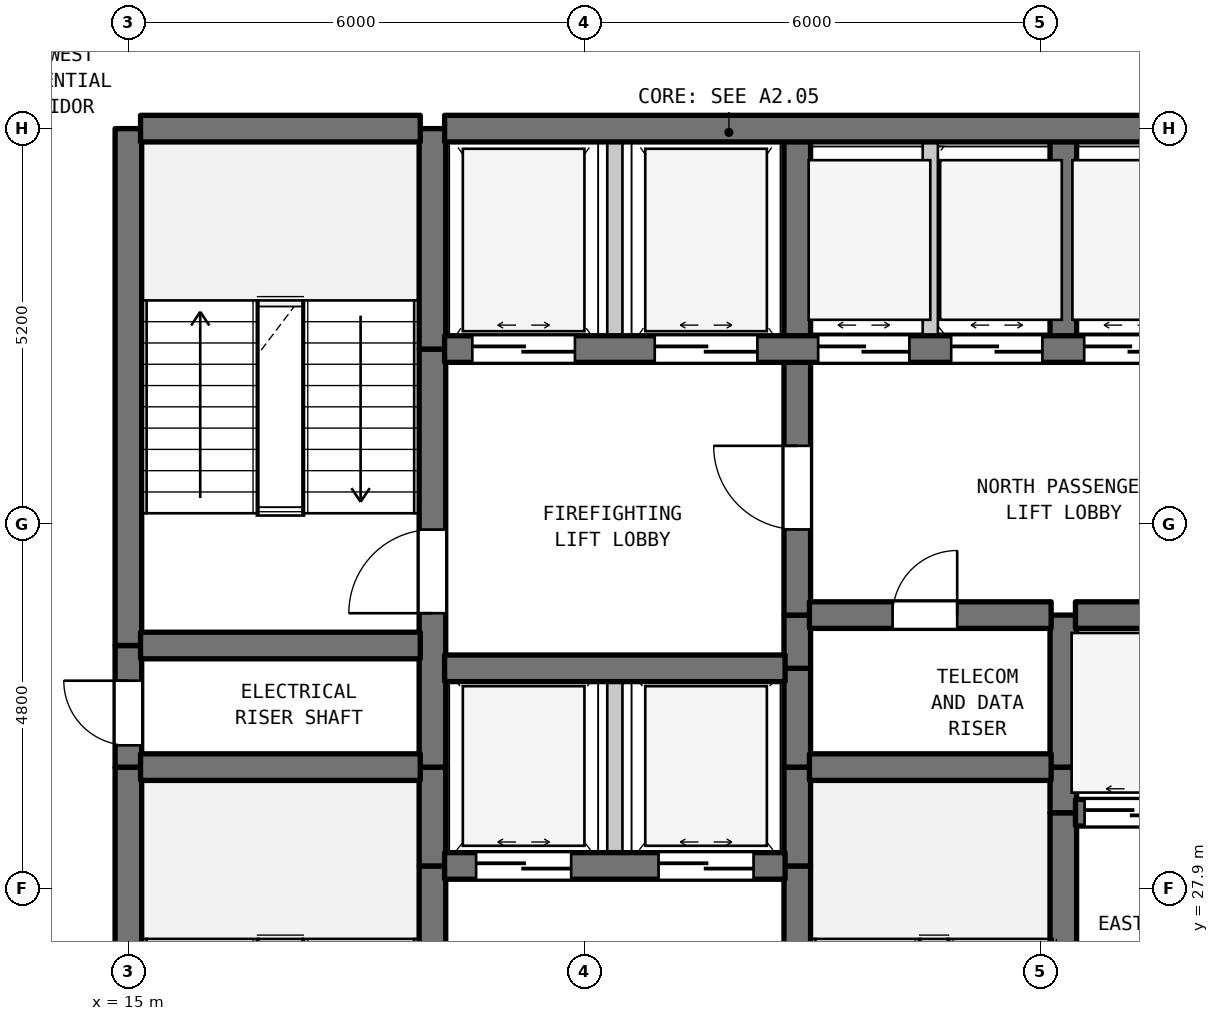
"""IFC4 building model, lengths in metres.
Left out: names, types, materials, properties, quantities, classifications, styles, units other than length and angle.
Written with IfcOpenShell. Run it as: python <this file> out.ifc"""

import sys

from ifc_helpers import new_model, si_unit, direction, frame, frame_2d, origin, place, context, subcontext, project, spatial, rectangle, extrude, element, fill, save


model = new_model("IFC4")
c1 = context("Model", 3, precision=1e-05, world=origin(), true_north=direction((0.0, 1.0)))
c2 = subcontext(c1, "Body", "Model", "MODEL_VIEW")
j1 = project(units=[si_unit("LENGTHUNIT", "METRE"), si_unit("PLANEANGLEUNIT", "RADIAN")], contexts=[c1])
p1 = place(None, origin())
s1 = spatial("IfcSite", under=j1, at=p1, CompositionType="ELEMENT")
p2 = place(p1, origin())
s2 = spatial("IfcBuilding", under=s1, at=p2, CompositionType="ELEMENT")
p3 = place(p2, frame((0.0, 0.0, 77.5)))
s3 = spatial("IfcBuildingStorey", under=s2, at=p3, CompositionType="ELEMENT", Elevation=77.5)
p4 = place(p3, frame((15.0, 22.7, 0.0), z_axis=(0.0, 0.0, 1.0), x_axis=(0.0, 1.0, 0.0)))
e1 = element("IfcWall", 1, at=p4, inside=s3, PredefinedType="SHEAR", context=c2, shape_type="SweptSolid", body=[
    extrude(rectangle(XDim=6.8, YDim=0.35, at=frame_2d((3.4, 0.0))), origin(), (0.0, 0.0, 1.0), 3.28),
])
p5 = place(p3, frame((15.0, 29.5, 0.0), z_axis=(0.0, 0.0, 1.0), x_axis=(0.0, 1.0, 0.0)))
e2 = element("IfcWall", 2, at=p5, inside=s3, PredefinedType="SHEAR", context=c2, shape_type="SweptSolid", body=[
    extrude(rectangle(XDim=1.6, YDim=0.35, at=frame_2d((0.8, 0.0))), origin(), (0.0, 0.0, 1.0), 3.28),
])
p6 = place(p5, frame((0.287, 0.0, 0.0)))
e3 = element("IfcOpeningElement", 3, at=p6, cuts=e2, PredefinedType="OPENING", context=c2, shape_type="SweptSolid", body=[
    extrude(rectangle(XDim=0.85, YDim=2.1, at=frame_2d((0.425, 1.05))), frame((0.0, 0.185, 0.0), z_axis=(0.0, -1.0, 0.0), x_axis=(1.0, 0.0, 0.0)), (0.0, 0.0, 1.0), 0.37),
])
p7 = place(p3, frame((15.0, 31.1, 0.0), z_axis=(0.0, 0.0, 1.0), x_axis=(0.0, 1.0, 0.0)))
e4 = element("IfcWall", 4, at=p7, inside=s3, PredefinedType="SHEAR", context=c2, shape_type="SweptSolid", body=[
    extrude(rectangle(XDim=6.8, YDim=0.35, at=frame_2d((3.4, 0.0))), origin(), (0.0, 0.0, 1.0), 3.28),
])
p8 = place(p3, frame((19.0, 22.7, 0.0), z_axis=(0.0, 0.0, 1.0), x_axis=(0.0, 1.0, 0.0)))
e5 = element("IfcWall", 5, at=p8, inside=s3, PredefinedType="SHEAR", context=c2, shape_type="SweptSolid", body=[
    extrude(rectangle(XDim=5.5, YDim=0.35, at=frame_2d((2.75, 0.0))), origin(), (0.0, 0.0, 1.0), 3.28),
])
p9 = place(p8, frame((0.631, 0.0, 0.0)))
e6 = element("IfcOpeningElement", 6, at=p9, cuts=e5, PredefinedType="OPENING", context=c2, shape_type="SweptSolid", body=[
    extrude(rectangle(XDim=1.1, YDim=2.15, at=frame_2d((0.55, 1.075))), frame((0.0, 0.185, 0.0), z_axis=(0.0, -1.0, 0.0), x_axis=(1.0, 0.0, 0.0)), (0.0, 0.0, 1.0), 0.37),
])
p10 = place(p3, frame((19.0, 28.2, 0.0), z_axis=(0.0, 0.0, 1.0), x_axis=(0.0, 1.0, 0.0)))
e7 = element("IfcWall", 7, at=p10, inside=s3, PredefinedType="SHEAR", context=c2, shape_type="SweptSolid", body=[
    extrude(rectangle(XDim=1.3, YDim=0.35, at=frame_2d((0.65, 0.0))), origin(), (0.0, 0.0, 1.0), 3.28),
])
p11 = place(p3, frame((19.0, 29.5, 0.0), z_axis=(0.0, 0.0, 1.0), x_axis=(0.0, 1.0, 0.0)))
e8 = element("IfcWall", 8, at=p11, inside=s3, PredefinedType="SHEAR", context=c2, shape_type="SweptSolid", body=[
    extrude(rectangle(XDim=5.5, YDim=0.35, at=frame_2d((2.75, 0.0))), origin(), (0.0, 0.0, 1.0), 3.28),
])
p12 = place(p11, frame((2.025, 0.0, 0.0)))
e9 = element("IfcOpeningElement", 9, at=p12, cuts=e8, PredefinedType="OPENING", context=c2, shape_type="SweptSolid", body=[
    extrude(rectangle(XDim=1.1, YDim=2.15, at=frame_2d((0.55, 1.075))), frame((0.0, 0.185, 0.0), z_axis=(0.0, -1.0, 0.0), x_axis=(1.0, 0.0, 0.0)), (0.0, 0.0, 1.0), 0.37),
])
p13 = place(p3, frame((19.0, 35.0, 0.0), z_axis=(0.0, 0.0, 1.0), x_axis=(0.0, 1.0, 0.0)))
e10 = element("IfcWall", 10, at=p13, inside=s3, PredefinedType="SHEAR", context=c2, shape_type="SweptSolid", body=[
    extrude(rectangle(XDim=2.9, YDim=0.35, at=frame_2d((1.45, 0.0))), origin(), (0.0, 0.0, 1.0), 3.28),
])
p14 = place(p3, frame((21.4, 28.2, 0.0), z_axis=(0.0, 0.0, 1.0), x_axis=(0.0, 1.0, 0.0)))
e11 = element("IfcWall", 11, at=p14, inside=s3, PredefinedType="STANDARD", context=c2, shape_type="SweptSolid", body=[
    extrude(rectangle(XDim=2.6, YDim=0.2, at=frame_2d((1.3, 0.0))), origin(), (0.0, 0.0, 1.0), 3.28),
])
p15 = place(p3, frame((21.4, 35.0, 0.0), z_axis=(0.0, 0.0, 1.0), x_axis=(0.0, 1.0, 0.0)))
e12 = element("IfcWall", 12, at=p15, inside=s3, PredefinedType="STANDARD", context=c2, shape_type="SweptSolid", body=[
    extrude(rectangle(XDim=2.9, YDim=0.2, at=frame_2d((1.45, 0.0))), origin(), (0.0, 0.0, 1.0), 3.28),
])
p16 = place(p3, frame((23.8, 22.7, 0.0), z_axis=(0.0, 0.0, 1.0), x_axis=(0.0, 1.0, 0.0)))
e13 = element("IfcWall", 13, at=p16, inside=s3, PredefinedType="SHEAR", context=c2, shape_type="SweptSolid", body=[
    extrude(rectangle(XDim=5.5, YDim=0.35, at=frame_2d((2.75, 0.0))), origin(), (0.0, 0.0, 1.0), 3.28),
])
p17 = place(p16, frame((0.235, 0.0, 0.0)))
e14 = element("IfcOpeningElement", 14, at=p17, cuts=e13, PredefinedType="OPENING", context=c2, shape_type="SweptSolid", body=[
    extrude(rectangle(XDim=1.1, YDim=2.15, at=frame_2d((0.55, 1.075))), frame((0.0, 0.185, 0.0), z_axis=(0.0, -1.0, 0.0), x_axis=(1.0, 0.0, 0.0)), (0.0, 0.0, 1.0), 0.37),
])
for number, where, z_axis, x_axis in (
    (15, (23.8, 28.2, 0.0), (0.0, 0.0, 1.0), (0.0, 1.0, 0.0)),
    (16, (23.8, 29.5, 0.0), (0.0, 0.0, 1.0), (0.0, 1.0, 0.0)),
):
    element("IfcWall", number, at=place(p3, frame(where, z_axis=z_axis, x_axis=x_axis)), inside=s3, PredefinedType="SHEAR", context=c2, shape_type="SweptSolid", body=[
        extrude(rectangle(XDim=1.3, YDim=0.35, at=frame_2d((0.65, 0.0))), origin(), (0.0, 0.0, 1.0), 3.28),
    ])
p18 = place(p3, frame((23.8, 30.8, 0.0), z_axis=(0.0, 0.0, 1.0), x_axis=(0.0, 1.0, 0.0)))
e17 = element("IfcWall", 17, at=p18, inside=s3, PredefinedType="SHEAR", context=c2, shape_type="SweptSolid", body=[
    extrude(rectangle(XDim=0.7, YDim=0.35, at=frame_2d((0.35, 0.0))), origin(), (0.0, 0.0, 1.0), 3.28),
])
p19 = place(p3, frame((23.8, 31.5, 0.0), z_axis=(0.0, 0.0, 1.0), x_axis=(0.0, 1.0, 0.0)))
e18 = element("IfcWall", 18, at=p19, inside=s3, PredefinedType="SHEAR", context=c2, shape_type="SweptSolid", body=[
    extrude(rectangle(XDim=3.5, YDim=0.35, at=frame_2d((1.75, 0.0))), origin(), (0.0, 0.0, 1.0), 3.28),
])
p20 = place(p19, frame((1.127, 0.0, 0.0)))
e19 = element("IfcOpeningElement", 19, at=p20, cuts=e18, PredefinedType="OPENING", context=c2, shape_type="SweptSolid", body=[
    extrude(rectangle(XDim=1.1, YDim=2.15, at=frame_2d((0.55, 1.075))), frame((0.0, 0.185, 0.0), z_axis=(0.0, -1.0, 0.0), x_axis=(1.0, 0.0, 0.0)), (0.0, 0.0, 1.0), 0.37),
])
p21 = place(p3, frame((23.8, 35.0, 0.0), z_axis=(0.0, 0.0, 1.0), x_axis=(0.0, 1.0, 0.0)))
e20 = element("IfcWall", 20, at=p21, inside=s3, PredefinedType="SHEAR", context=c2, shape_type="SweptSolid", body=[
    extrude(rectangle(XDim=2.9, YDim=0.35, at=frame_2d((1.45, 0.0))), origin(), (0.0, 0.0, 1.0), 3.28),
])
p22 = place(p3, frame((25.55, 35.0, 0.0), z_axis=(0.0, 0.0, 1.0), x_axis=(0.0, 1.0, 0.0)))
e21 = element("IfcWall", 21, at=p22, inside=s3, PredefinedType="STANDARD", context=c2, shape_type="SweptSolid", body=[
    extrude(rectangle(XDim=2.9, YDim=0.2, at=frame_2d((1.45, 0.0))), origin(), (0.0, 0.0, 1.0), 3.28),
])
p23 = place(p3, frame((27.3, 25.6, 0.0), z_axis=(0.0, 0.0, 1.0), x_axis=(0.0, 1.0, 0.0)))
e22 = element("IfcWall", 22, at=p23, inside=s3, PredefinedType="SHEAR", context=c2, shape_type="SweptSolid", body=[
    extrude(rectangle(XDim=3.3, YDim=0.35, at=frame_2d((1.65, 0.0))), origin(), (0.0, 0.0, 1.0), 3.28),
])
p24 = place(p3, frame((27.3, 28.9, 0.0), z_axis=(0.0, 0.0, 1.0), x_axis=(0.0, 1.0, 0.0)))
e23 = element("IfcWall", 23, at=p24, inside=s3, PredefinedType="SHEAR", context=c2, shape_type="SweptSolid", body=[
    extrude(rectangle(XDim=0.6, YDim=0.35, at=frame_2d((0.3, 0.0))), origin(), (0.0, 0.0, 1.0), 3.28),
])
p25 = place(p3, frame((27.3, 29.5, 0.0), z_axis=(0.0, 0.0, 1.0), x_axis=(0.0, 1.0, 0.0)))
e24 = element("IfcWall", 24, at=p25, inside=s3, PredefinedType="SHEAR", context=c2, shape_type="SweptSolid", body=[
    extrude(rectangle(XDim=2.0, YDim=0.35, at=frame_2d((1.0, 0.0))), origin(), (0.0, 0.0, 1.0), 3.28),
])
p26 = place(p3, frame((27.3, 35.0, 0.0), z_axis=(0.0, 0.0, 1.0), x_axis=(0.0, 1.0, 0.0)))
e25 = element("IfcWall", 25, at=p26, inside=s3, PredefinedType="SHEAR", context=c2, shape_type="SweptSolid", body=[
    extrude(rectangle(XDim=2.9, YDim=0.35, at=frame_2d((1.45, 0.0))), origin(), (0.0, 0.0, 1.0), 3.28),
])
p27 = place(p3, frame((19.16, 28.2, 0.0), z_axis=(0.0, 0.0, 1.0), x_axis=(1.0, 0.0, 0.0)))
e26 = element("IfcWall", 26, at=p27, inside=s3, PredefinedType="SHEAR", context=c2, shape_type="SweptSolid", body=[
    extrude(rectangle(XDim=4.48, YDim=0.35, at=frame_2d((2.24, 0.0))), origin(), (0.0, 0.0, 1.0), 3.28),
])
p28 = place(p27, frame((0.415, 0.0, 0.0)))
e27 = element("IfcOpeningElement", 27, at=p28, cuts=e26, PredefinedType="OPENING", context=c2, shape_type="SweptSolid", body=[
    extrude(rectangle(XDim=1.25, YDim=2.2, at=frame_2d((0.625, 1.1))), frame((0.0, 0.185, 0.0), z_axis=(0.0, -1.0, 0.0), x_axis=(1.0, 0.0, 0.0)), (0.0, 0.0, 1.0), 0.37),
])
p29 = place(p27, frame((2.815, 0.0, 0.0)))
e28 = element("IfcOpeningElement", 28, at=p29, cuts=e26, PredefinedType="OPENING", context=c2, shape_type="SweptSolid", body=[
    extrude(rectangle(XDim=1.25, YDim=2.2, at=frame_2d((0.625, 1.1))), frame((0.0, 0.185, 0.0), z_axis=(0.0, -1.0, 0.0), x_axis=(1.0, 0.0, 0.0)), (0.0, 0.0, 1.0), 0.37),
])
p30 = place(p3, frame((27.46, 28.9, 0.0), z_axis=(0.0, 0.0, 1.0), x_axis=(1.0, 0.0, 0.0)))
e29 = element("IfcWall", 29, at=p30, inside=s3, PredefinedType="SHEAR", context=c2, shape_type="SweptSolid", body=[
    extrude(rectangle(XDim=3.18, YDim=0.35, at=frame_2d((1.59, 0.0))), origin(), (0.0, 0.0, 1.0), 3.28),
])
p31 = place(p30, frame((0.12, 0.0, 0.0)))
e30 = element("IfcOpeningElement", 30, at=p31, cuts=e29, PredefinedType="OPENING", context=c2, shape_type="SweptSolid", body=[
    extrude(rectangle(XDim=1.25, YDim=2.2, at=frame_2d((0.625, 1.1))), frame((0.0, 0.185, 0.0), z_axis=(0.0, -1.0, 0.0), x_axis=(1.0, 0.0, 0.0)), (0.0, 0.0, 1.0), 0.37),
])
p32 = place(p30, frame((1.81, 0.0, 0.0)))
e31 = element("IfcOpeningElement", 31, at=p32, cuts=e29, PredefinedType="OPENING", context=c2, shape_type="SweptSolid", body=[
    extrude(rectangle(XDim=1.25, YDim=2.2, at=frame_2d((0.625, 1.1))), frame((0.0, 0.185, 0.0), z_axis=(0.0, -1.0, 0.0), x_axis=(1.0, 0.0, 0.0)), (0.0, 0.0, 1.0), 0.37),
])
p33 = place(p3, frame((15.16, 29.5, 0.0), z_axis=(0.0, 0.0, 1.0), x_axis=(1.0, 0.0, 0.0)))
e32 = element("IfcWall", 32, at=p33, inside=s3, PredefinedType="SHEAR", context=c2, shape_type="SweptSolid", body=[
    extrude(rectangle(XDim=3.68, YDim=0.35, at=frame_2d((1.84, 0.0))), origin(), (0.0, 0.0, 1.0), 3.28),
])
p34 = place(p3, frame((23.96, 29.5, 0.0), z_axis=(0.0, 0.0, 1.0), x_axis=(1.0, 0.0, 0.0)))
e33 = element("IfcWall", 33, at=p34, inside=s3, PredefinedType="SHEAR", context=c2, shape_type="SweptSolid", body=[
    extrude(rectangle(XDim=3.18, YDim=0.35, at=frame_2d((1.59, 0.0))), origin(), (0.0, 0.0, 1.0), 3.28),
])
p35 = place(p3, frame((19.16, 30.8, 0.0), z_axis=(0.0, 0.0, 1.0), x_axis=(1.0, 0.0, 0.0)))
e34 = element("IfcWall", 34, at=p35, inside=s3, PredefinedType="SHEAR", context=c2, shape_type="SweptSolid", body=[
    extrude(rectangle(XDim=4.48, YDim=0.35, at=frame_2d((2.24, 0.0))), origin(), (0.0, 0.0, 1.0), 3.28),
])
p36 = place(p3, frame((15.16, 31.1, 0.0), z_axis=(0.0, 0.0, 1.0), x_axis=(1.0, 0.0, 0.0)))
e35 = element("IfcWall", 35, at=p36, inside=s3, PredefinedType="SHEAR", context=c2, shape_type="SweptSolid", body=[
    extrude(rectangle(XDim=3.68, YDim=0.35, at=frame_2d((1.84, 0.0))), origin(), (0.0, 0.0, 1.0), 3.28),
])
p37 = place(p3, frame((23.96, 31.5, 0.0), z_axis=(0.0, 0.0, 1.0), x_axis=(1.0, 0.0, 0.0)))
e36 = element("IfcWall", 36, at=p37, inside=s3, PredefinedType="SHEAR", context=c2, shape_type="SweptSolid", body=[
    extrude(rectangle(XDim=3.18, YDim=0.35, at=frame_2d((1.59, 0.0))), origin(), (0.0, 0.0, 1.0), 3.28),
])
p38 = place(p37, frame((1.094, 0.0, 0.0)))
e37 = element("IfcOpeningElement", 37, at=p38, cuts=e36, PredefinedType="OPENING", context=c2, shape_type="SweptSolid", body=[
    extrude(rectangle(XDim=0.85, YDim=2.1, at=frame_2d((0.425, 1.05))), frame((0.0, 0.185, 0.0), z_axis=(0.0, -1.0, 0.0), x_axis=(1.0, 0.0, 0.0)), (0.0, 0.0, 1.0), 0.37),
])
p39 = place(p3, frame((27.46, 31.5, 0.0), z_axis=(0.0, 0.0, 1.0), x_axis=(1.0, 0.0, 0.0)))
e38 = element("IfcWall", 38, at=p39, inside=s3, PredefinedType="SHEAR", context=c2, shape_type="SweptSolid", body=[
    extrude(rectangle(XDim=3.18, YDim=0.35, at=frame_2d((1.59, 0.0))), origin(), (0.0, 0.0, 1.0), 3.28),
])
p40 = place(p3, frame((19.16, 35.0, 0.0), z_axis=(0.0, 0.0, 1.0), x_axis=(1.0, 0.0, 0.0)))
e39 = element("IfcWall", 39, at=p40, inside=s3, PredefinedType="SHEAR", context=c2, shape_type="SweptSolid", body=[
    extrude(rectangle(XDim=11.48, YDim=0.35, at=frame_2d((5.74, 0.0))), origin(), (0.0, 0.0, 1.0), 3.28),
])
p41 = place(p40, frame((0.365, 0.0, 0.0)))
e40 = element("IfcOpeningElement", 40, at=p41, cuts=e39, PredefinedType="OPENING", context=c2, shape_type="SweptSolid", body=[
    extrude(rectangle(XDim=1.35, YDim=2.2, at=frame_2d((0.675, 1.1))), frame((0.0, 0.185, 0.0), z_axis=(0.0, -1.0, 0.0), x_axis=(1.0, 0.0, 0.0)), (0.0, 0.0, 1.0), 0.37),
])
p42 = place(p40, frame((2.765, 0.0, 0.0)))
e41 = element("IfcOpeningElement", 41, at=p42, cuts=e39, PredefinedType="OPENING", context=c2, shape_type="SweptSolid", body=[
    extrude(rectangle(XDim=1.35, YDim=2.2, at=frame_2d((0.675, 1.1))), frame((0.0, 0.185, 0.0), z_axis=(0.0, -1.0, 0.0), x_axis=(1.0, 0.0, 0.0)), (0.0, 0.0, 1.0), 0.37),
])
p43 = place(p40, frame((4.915, 0.0, 0.0)))
e42 = element("IfcOpeningElement", 42, at=p43, cuts=e39, PredefinedType="OPENING", context=c2, shape_type="SweptSolid", body=[
    extrude(rectangle(XDim=1.2, YDim=2.2, at=frame_2d((0.6, 1.1))), frame((0.0, 0.185, 0.0), z_axis=(0.0, -1.0, 0.0), x_axis=(1.0, 0.0, 0.0)), (0.0, 0.0, 1.0), 0.37),
])
p44 = place(p40, frame((6.665, 0.0, 0.0)))
e43 = element("IfcOpeningElement", 43, at=p44, cuts=e39, PredefinedType="OPENING", context=c2, shape_type="SweptSolid", body=[
    extrude(rectangle(XDim=1.2, YDim=2.2, at=frame_2d((0.6, 1.1))), frame((0.0, 0.185, 0.0), z_axis=(0.0, -1.0, 0.0), x_axis=(1.0, 0.0, 0.0)), (0.0, 0.0, 1.0), 0.37),
])
p45 = place(p40, frame((8.415, 0.0, 0.0)))
e44 = element("IfcOpeningElement", 44, at=p45, cuts=e39, PredefinedType="OPENING", context=c2, shape_type="SweptSolid", body=[
    extrude(rectangle(XDim=1.2, YDim=2.2, at=frame_2d((0.6, 1.1))), frame((0.0, 0.185, 0.0), z_axis=(0.0, -1.0, 0.0), x_axis=(1.0, 0.0, 0.0)), (0.0, 0.0, 1.0), 0.37),
])
p46 = place(p40, frame((10.16, 0.0, 0.0)))
e45 = element("IfcOpeningElement", 45, at=p46, cuts=e39, PredefinedType="OPENING", context=c2, shape_type="SweptSolid", body=[
    extrude(rectangle(XDim=1.2, YDim=2.2, at=frame_2d((0.6, 1.1))), frame((0.0, 0.185, 0.0), z_axis=(0.0, -1.0, 0.0), x_axis=(1.0, 0.0, 0.0)), (0.0, 0.0, 1.0), 0.37),
])
p47 = place(p3, frame((15.16, 37.9, 0.0), z_axis=(0.0, 0.0, 1.0), x_axis=(1.0, 0.0, 0.0)))
e46 = element("IfcWall", 46, at=p47, inside=s3, PredefinedType="SHEAR", context=c2, shape_type="SweptSolid", body=[
    extrude(rectangle(XDim=3.68, YDim=0.35, at=frame_2d((1.84, 0.0))), origin(), (0.0, 0.0, 1.0), 3.28),
])
p48 = place(p3, frame((19.16, 37.9, 0.0), z_axis=(0.0, 0.0, 1.0), x_axis=(1.0, 0.0, 0.0)))
e47 = element("IfcWall", 47, at=p48, inside=s3, PredefinedType="SHEAR", context=c2, shape_type="SweptSolid", body=[
    extrude(rectangle(XDim=11.48, YDim=0.35, at=frame_2d((5.74, 0.0))), origin(), (0.0, 0.0, 1.0), 3.28),
])
p49 = place(p6, origin())
e48 = element("IfcDoor", 48, at=p49, inside=s3, OperationType="SINGLE_SWING_RIGHT", PredefinedType="DOOR", context=c2, shape_type="SweptSolid", body=[
    extrude(rectangle(XDim=0.85, YDim=2.1, at=frame_2d((0.425, 1.05))), frame((0.0, 0.025, 0.0), z_axis=(0.0, -1.0, 0.0), x_axis=(1.0, 0.0, 0.0)), (0.0, 0.0, 1.0), 0.05),
])
fill(e3, e48)
p50 = place(p12, origin())
e49 = element("IfcDoor", 49, at=p50, inside=s3, OperationType="SINGLE_SWING_LEFT", PredefinedType="DOOR", context=c2, shape_type="SweptSolid", body=[
    extrude(rectangle(XDim=1.1, YDim=2.15, at=frame_2d((0.55, 1.075))), frame((0.0, 0.025, 0.0), z_axis=(0.0, -1.0, 0.0), x_axis=(1.0, 0.0, 0.0)), (0.0, 0.0, 1.0), 0.05),
])
fill(e9, e49)
p51 = place(p20, origin())
e50 = element("IfcDoor", 50, at=p51, inside=s3, OperationType="SINGLE_SWING_RIGHT", PredefinedType="DOOR", context=c2, shape_type="SweptSolid", body=[
    extrude(rectangle(XDim=1.1, YDim=2.15, at=frame_2d((0.55, 1.075))), frame((0.0, 0.025, 0.0), z_axis=(0.0, -1.0, 0.0), x_axis=(1.0, 0.0, 0.0)), (0.0, 0.0, 1.0), 0.05),
])
fill(e19, e50)
p52 = place(p28, origin())
e51 = element("IfcDoor", 51, at=p52, inside=s3, OperationType="DOUBLE_DOOR_SLIDING", PredefinedType="DOOR", context=c2, shape_type="SweptSolid", body=[
    extrude(rectangle(XDim=1.25, YDim=2.2, at=frame_2d((0.625, 1.1))), frame((0.0, 0.025, 0.0), z_axis=(0.0, -1.0, 0.0), x_axis=(1.0, 0.0, 0.0)), (0.0, 0.0, 1.0), 0.05),
])
fill(e27, e51)
p53 = place(p29, origin())
e52 = element("IfcDoor", 52, at=p53, inside=s3, OperationType="DOUBLE_DOOR_SLIDING", PredefinedType="DOOR", context=c2, shape_type="SweptSolid", body=[
    extrude(rectangle(XDim=1.25, YDim=2.2, at=frame_2d((0.625, 1.1))), frame((0.0, 0.025, 0.0), z_axis=(0.0, -1.0, 0.0), x_axis=(1.0, 0.0, 0.0)), (0.0, 0.0, 1.0), 0.05),
])
fill(e28, e52)
p54 = place(p31, origin())
e53 = element("IfcDoor", 53, at=p54, inside=s3, OperationType="DOUBLE_DOOR_SLIDING", PredefinedType="DOOR", context=c2, shape_type="SweptSolid", body=[
    extrude(rectangle(XDim=1.25, YDim=2.2, at=frame_2d((0.625, 1.1))), frame((0.0, 0.025, 0.0), z_axis=(0.0, -1.0, 0.0), x_axis=(1.0, 0.0, 0.0)), (0.0, 0.0, 1.0), 0.05),
])
fill(e30, e53)
p55 = place(p38, origin())
e54 = element("IfcDoor", 54, at=p55, inside=s3, OperationType="SINGLE_SWING_RIGHT", PredefinedType="DOOR", context=c2, shape_type="SweptSolid", body=[
    extrude(rectangle(XDim=0.85, YDim=2.1, at=frame_2d((0.425, 1.05))), frame((0.0, 0.025, 0.0), z_axis=(0.0, -1.0, 0.0), x_axis=(1.0, 0.0, 0.0)), (0.0, 0.0, 1.0), 0.05),
])
fill(e37, e54)
p56 = place(p41, origin())
e55 = element("IfcDoor", 55, at=p56, inside=s3, OperationType="DOUBLE_DOOR_SLIDING", PredefinedType="DOOR", context=c2, shape_type="SweptSolid", body=[
    extrude(rectangle(XDim=1.35, YDim=2.2, at=frame_2d((0.675, 1.1))), frame((0.0, 0.025, 0.0), z_axis=(0.0, -1.0, 0.0), x_axis=(1.0, 0.0, 0.0)), (0.0, 0.0, 1.0), 0.05),
])
fill(e40, e55)
p57 = place(p42, origin())
e56 = element("IfcDoor", 56, at=p57, inside=s3, OperationType="DOUBLE_DOOR_SLIDING", PredefinedType="DOOR", context=c2, shape_type="SweptSolid", body=[
    extrude(rectangle(XDim=1.35, YDim=2.2, at=frame_2d((0.675, 1.1))), frame((0.0, 0.025, 0.0), z_axis=(0.0, -1.0, 0.0), x_axis=(1.0, 0.0, 0.0)), (0.0, 0.0, 1.0), 0.05),
])
fill(e41, e56)
p58 = place(p43, origin())
e57 = element("IfcDoor", 57, at=p58, inside=s3, OperationType="DOUBLE_DOOR_SLIDING", PredefinedType="DOOR", context=c2, shape_type="SweptSolid", body=[
    extrude(rectangle(XDim=1.2, YDim=2.2, at=frame_2d((0.6, 1.1))), frame((0.0, 0.025, 0.0), z_axis=(0.0, -1.0, 0.0), x_axis=(1.0, 0.0, 0.0)), (0.0, 0.0, 1.0), 0.05),
])
fill(e42, e57)
p59 = place(p44, origin())
e58 = element("IfcDoor", 58, at=p59, inside=s3, OperationType="DOUBLE_DOOR_SLIDING", PredefinedType="DOOR", context=c2, shape_type="SweptSolid", body=[
    extrude(rectangle(XDim=1.2, YDim=2.2, at=frame_2d((0.6, 1.1))), frame((0.0, 0.025, 0.0), z_axis=(0.0, -1.0, 0.0), x_axis=(1.0, 0.0, 0.0)), (0.0, 0.0, 1.0), 0.05),
])
fill(e43, e58)
p60 = place(p45, origin())
e59 = element("IfcDoor", 59, at=p60, inside=s3, OperationType="DOUBLE_DOOR_SLIDING", PredefinedType="DOOR", context=c2, shape_type="SweptSolid", body=[
    extrude(rectangle(XDim=1.2, YDim=2.2, at=frame_2d((0.6, 1.1))), frame((0.0, 0.025, 0.0), z_axis=(0.0, -1.0, 0.0), x_axis=(1.0, 0.0, 0.0)), (0.0, 0.0, 1.0), 0.05),
])
fill(e44, e59)
save(model, sys.argv[1])
